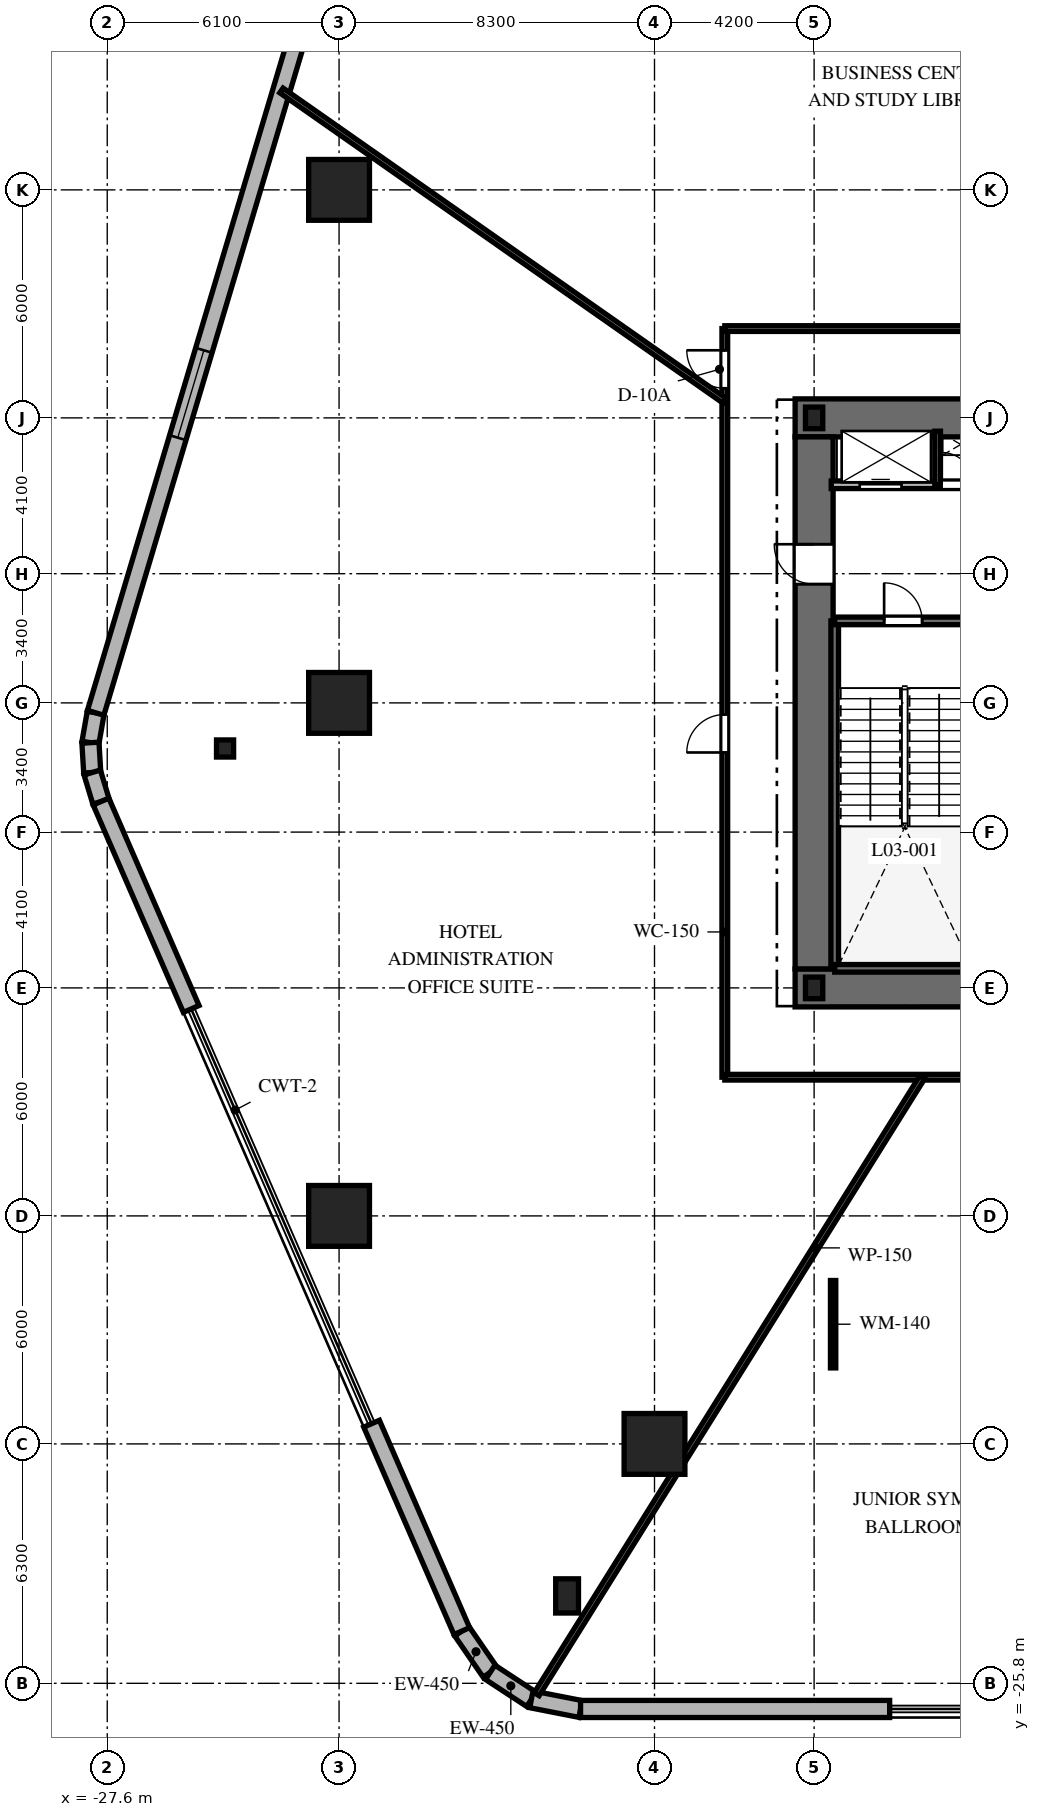
"""IFC4 building model, lengths in metres.
Left out: names, types, materials, properties, quantities, classifications, styles, units other than length and angle.
Written with IfcOpenShell. Run it as: python <this file> out.ifc"""

import sys

from ifc_helpers import new_model, si_unit, direction, frame, frame_2d, origin, origin_2d, place, context, subcontext, project, spatial, rectangle, i_section, extrude, element, fill, save


model = new_model("IFC4")
c1 = context("Model", 3, precision=1e-05, world=origin(), true_north=direction((0.0, 1.0)))
c2 = subcontext(c1, "Body", "Model", "MODEL_VIEW")
j1 = project(units=[si_unit("LENGTHUNIT", "METRE"), si_unit("PLANEANGLEUNIT", "RADIAN")], contexts=[c1])
p1 = place(None, origin())
s1 = spatial("IfcSite", under=j1, at=p1, CompositionType="ELEMENT")
p2 = place(p1, origin())
s2 = spatial("IfcBuilding", under=s1, at=p2, CompositionType="ELEMENT")
p3 = place(p2, frame((0.0, 0.0, 18.6)))
s3 = spatial("IfcBuildingStorey", under=s2, at=p3, CompositionType="ELEMENT", Elevation=18.6)
p4 = place(p3, frame((-9.5, -7.5, 0.0), z_axis=(0.0, 0.0, 1.0), x_axis=(1.0, 0.0, 0.0)))
e1 = element("IfcWall", 1, at=p4, inside=s3, PredefinedType="SHEAR", context=c2, shape_type="SweptSolid", body=[
    extrude(rectangle(XDim=19.0, YDim=1.0, at=frame_2d((9.5, 0.0))), origin(), (0.0, 0.0, 1.0), 4.8),
])
p5 = place(p4, frame((9.55, 0.0, 0.0)))
e2 = element("IfcOpeningElement", 2, at=p5, cuts=e1, PredefinedType="OPENING", context=c2, shape_type="SweptSolid", body=[
    extrude(rectangle(XDim=1.0, YDim=2.15, at=frame_2d((0.5, 1.075))), frame((0.0, 0.51, 0.0), z_axis=(0.0, -1.0, 0.0), x_axis=(1.0, 0.0, 0.0)), (0.0, 0.0, 1.0), 1.02),
])
p6 = place(p3, frame((-9.5, 7.5, 0.0), z_axis=(0.0, 0.0, 1.0), x_axis=(1.0, 0.0, 0.0)))
e3 = element("IfcWall", 3, at=p6, inside=s3, PredefinedType="SHEAR", context=c2, shape_type="SweptSolid", body=[
    extrude(rectangle(XDim=9.55, YDim=1.0, at=frame_2d((4.775, 0.0))), origin(), (0.0, 0.0, 1.0), 4.8),
])
p7 = place(p3, frame((-9.0, -7.0, 0.0), z_axis=(0.0, 0.0, 1.0), x_axis=(0.0, 1.0, 0.0)))
e4 = element("IfcWall", 4, at=p7, inside=s3, PredefinedType="SHEAR", context=c2, shape_type="SweptSolid", body=[
    extrude(rectangle(XDim=14.0, YDim=1.0, at=frame_2d((7.0, 0.0))), origin(), (0.0, 0.0, 1.0), 4.8),
])
p8 = place(p7, frame((10.125, 0.0, 0.0)))
e5 = element("IfcOpeningElement", 5, at=p8, cuts=e4, PredefinedType="OPENING", context=c2, shape_type="SweptSolid", body=[
    extrude(rectangle(XDim=1.05, YDim=2.15, at=frame_2d((0.525, 1.075))), frame((0.0, 0.51, 0.0), z_axis=(0.0, -1.0, 0.0), x_axis=(1.0, 0.0, 0.0)), (0.0, 0.0, 1.0), 1.02),
])
p9 = place(p3, frame((-8.458, -6.985, 0.0), z_axis=(0.0, 0.0, 1.0), x_axis=(0.0, 1.0, 0.0)))
e6 = element("IfcWall", 6, at=p9, inside=s3, PredefinedType="SHEAR", context=c2, shape_type="SweptSolid", body=[
    extrude(rectangle(XDim=9.143, YDim=0.2, at=frame_2d((4.572, 0.0))), origin(), (0.0, 0.0, 1.0), 4.8),
])
p10 = place(p3, frame((-8.458, -6.985, 0.0), z_axis=(0.0, 0.0, 1.0), x_axis=(1.0, 0.0, 0.0)))
e7 = element("IfcWall", 7, at=p10, inside=s3, PredefinedType="SHEAR", context=c2, shape_type="SweptSolid", body=[
    extrude(rectangle(XDim=3.686, YDim=0.2, at=frame_2d((1.843, 0.0))), origin(), (0.0, 0.0, 1.0), 4.8),
])
p11 = place(p3, frame((-8.458, 2.158, 0.0), z_axis=(0.0, 0.0, 1.0), x_axis=(1.0, 0.0, 0.0)))
e8 = element("IfcWall", 8, at=p11, inside=s3, PredefinedType="SHEAR", context=c2, shape_type="SweptSolid", body=[
    extrude(rectangle(XDim=3.686, YDim=0.2, at=frame_2d((1.843, 0.0))), origin(), (0.0, 0.0, 1.0), 4.8),
])
p12 = place(p11, frame((1.3, 0.0, 0.0)))
e9 = element("IfcOpeningElement", 9, at=p12, cuts=e8, PredefinedType="OPENING", context=c2, shape_type="SweptSolid", body=[
    extrude(rectangle(XDim=1.0, YDim=2.15, at=frame_2d((0.5, 1.075))), frame((0.0, 0.11, 0.0), z_axis=(0.0, -1.0, 0.0), x_axis=(1.0, 0.0, 0.0)), (0.0, 0.0, 1.0), 0.22),
])
for number, where, z_axis, x_axis in (
    (10, (-9.0, -7.5, 0.0), (0.0, 0.0, 1.0), (1.0, 0.0, 0.0)),
    (11, (-9.0, 7.5, 0.0), (0.0, 0.0, 1.0), (1.0, 0.0, 0.0)),
):
    element("IfcColumn", number, at=place(p3, frame(where, z_axis=z_axis, x_axis=x_axis)), inside=s3, PredefinedType="COLUMN", context=c2, shape_type="SweptSolid", body=[
        extrude(i_section(OverallWidth=0.454, OverallDepth=0.569, WebThickness=0.078, FlangeThickness=0.125, at=origin_2d()), origin(), (0.0, 0.0, 1.0), 4.8),
    ])
for number, where, z_axis, x_axis in (
    (12, (-21.5, -13.5, 0.0), (0.0, 0.0, 1.0), (1.0, 0.0, 0.0)),
    (13, (-21.5, 0.0, 0.0), (0.0, 0.0, 1.0), (1.0, 0.0, 0.0)),
    (14, (-21.5, 13.5, 0.0), (0.0, 0.0, 1.0), (1.0, 0.0, 0.0)),
    (15, (-13.2, -19.5, 0.0), (0.0, 0.0, 1.0), (1.0, 0.0, 0.0)),
):
    element("IfcColumn", number, at=place(p3, frame(where, z_axis=z_axis, x_axis=x_axis)), inside=s3, PredefinedType="COLUMN", context=c2, shape_type="SweptSolid", body=[
        extrude(rectangle(XDim=1.6, YDim=1.6, at=origin_2d()), origin(), (0.0, 0.0, 1.0), 4.8),
    ])
p13 = place(p3, frame((-15.5, -23.5, 0.0), z_axis=(0.0, 0.0, 1.0), x_axis=(1.0, 0.0, 0.0)))
e16 = element("IfcColumn", 16, at=p13, inside=s3, PredefinedType="PILASTER", context=c2, shape_type="SweptSolid", body=[
    extrude(rectangle(XDim=0.6, YDim=0.9, at=origin_2d()), origin(), (0.0, 0.0, 1.0), 4.8),
])
p14 = place(p3, frame((-24.5, -1.2, 0.0), z_axis=(0.0, 0.0, 1.0), x_axis=(1.0, 0.0, 0.0)))
e17 = element("IfcColumn", 17, at=p14, inside=s3, PredefinedType="PILASTER", context=c2, shape_type="SweptSolid", body=[
    extrude(rectangle(XDim=0.45, YDim=0.45, at=origin_2d()), origin(), (0.0, 0.0, 1.0), 4.8),
])
p15 = place(p3, frame((-18.271, -24.426, 0.0), z_axis=(0.0, 0.0, 1.0), x_axis=(0.567629051817, -0.823284434162, 0.0)))
e18 = element("IfcWall", 18, at=p15, inside=s3, PredefinedType="SOLIDWALL", context=c2, shape_type="SweptSolid", body=[
    extrude(rectangle(XDim=1.318, YDim=0.45, at=frame_2d((0.659, 0.0))), origin(), (0.0, 0.0, 1.0), 4.48),
])
p16 = place(p3, frame((-17.523, -25.511, 0.0), z_axis=(0.0, 0.0, 1.0), x_axis=(0.83622878949, -0.548380717776, 0.0)))
e19 = element("IfcWall", 19, at=p16, inside=s3, PredefinedType="SOLIDWALL", context=c2, shape_type="SweptSolid", body=[
    extrude(rectangle(XDim=1.296, YDim=0.45, at=frame_2d((0.648, 0.0))), origin(), (0.0, 0.0, 1.0), 4.48),
])
p17 = place(p3, frame((-16.439, -26.222, 0.0), z_axis=(0.0, 0.0, 1.0), x_axis=(0.98134938685, -0.192232621919, 0.0)))
e20 = element("IfcWall", 20, at=p17, inside=s3, PredefinedType="SOLIDWALL", context=c2, shape_type="SweptSolid", body=[
    extrude(rectangle(XDim=1.318, YDim=0.45, at=frame_2d((0.659, 0.0))), origin(), (0.0, 0.0, 1.0), 4.48),
])
p18 = place(p3, frame((-27.905, -0.26, 0.0), z_axis=(0.0, 0.0, 1.0), x_axis=(-0.17266943956, -0.984979829561, 0.0)))
e21 = element("IfcWall", 21, at=p18, inside=s3, PredefinedType="SOLIDWALL", context=c2, shape_type="SweptSolid", body=[
    extrude(rectangle(XDim=0.799, YDim=0.45, at=frame_2d((0.399, 0.0))), origin(), (0.0, 0.0, 1.0), 4.48),
])
p19 = place(p3, frame((-28.042, -1.047, 0.0), z_axis=(0.0, 0.0, 1.0), x_axis=(0.059960394052, -0.998200756935, 0.0)))
e22 = element("IfcWall", 22, at=p19, inside=s3, PredefinedType="SOLIDWALL", context=c2, shape_type="SweptSolid", body=[
    extrude(rectangle(XDim=0.786, YDim=0.45, at=frame_2d((0.393, 0.0))), origin(), (0.0, 0.0, 1.0), 4.48),
])
p20 = place(p3, frame((-27.995, -1.832, 0.0), z_axis=(0.0, 0.0, 1.0), x_axis=(0.2894220622, -0.957201582694, 0.0)))
e23 = element("IfcWall", 23, at=p20, inside=s3, PredefinedType="SOLIDWALL", context=c2, shape_type="SweptSolid", body=[
    extrude(rectangle(XDim=0.799, YDim=0.45, at=frame_2d((0.399, 0.0))), origin(), (0.0, 0.0, 1.0), 4.48),
])
p21 = place(p3, frame((-15.146, -26.475, 0.0), z_axis=(0.0, 0.0, 1.0), x_axis=(1.0, 0.0, 0.0)))
e24 = element("IfcWall", 24, at=p21, inside=s3, PredefinedType="SOLIDWALL", context=c2, shape_type="SweptSolid", body=[
    extrude(rectangle(XDim=8.133, YDim=0.45, at=frame_2d((4.066, 0.0))), origin(), (0.0, 0.0, 1.0), 4.48),
])
p22 = place(p3, frame((-20.651, 24.042, 0.0), z_axis=(0.0, 0.0, 1.0), x_axis=(-0.286003469805, -0.958228581947, 0.0)))
e25 = element("IfcWall", 25, at=p22, inside=s3, PredefinedType="SOLIDWALL", context=c2, shape_type="SweptSolid", body=[
    extrude(rectangle(XDim=25.362, YDim=0.45, at=frame_2d((12.681, 0.0))), origin(), (0.0, 0.0, 1.0), 4.48),
])
p23 = place(p22, frame((3.157, 0.0, 0.85)))
e26 = element("IfcOpeningElement", 26, at=p23, cuts=e25, PredefinedType="OPENING", context=c2, shape_type="SweptSolid", body=[
    extrude(rectangle(XDim=2.4, YDim=2.4, at=frame_2d((1.2, 1.2))), frame((0.0, 0.235, 0.0), z_axis=(0.0, -1.0, 0.0), x_axis=(1.0, 0.0, 0.0)), (0.0, 0.0, 1.0), 0.47),
])
p24 = place(p22, frame((15.407, 0.0, 0.85)))
e27 = element("IfcOpeningElement", 27, at=p24, cuts=e25, PredefinedType="OPENING", context=c2, shape_type="SweptSolid", body=[
    extrude(rectangle(XDim=2.4, YDim=2.4, at=frame_2d((1.2, 1.2))), frame((0.0, 0.235, 0.0), z_axis=(0.0, -1.0, 0.0), x_axis=(1.0, 0.0, 0.0)), (0.0, 0.0, 1.0), 0.47),
])
p25 = place(p3, frame((-27.764, -2.596, 0.0), z_axis=(0.0, 0.0, 1.0), x_axis=(0.398805616553, -0.917035484704, 0.0)))
e28 = element("IfcWall", 28, at=p25, inside=s3, PredefinedType="SOLIDWALL", context=c2, shape_type="SweptSolid", body=[
    extrude(rectangle(XDim=5.951, YDim=0.45, at=frame_2d((2.976, 0.0))), origin(), (0.0, 0.0, 1.0), 4.48),
])
p26 = place(p3, frame((-20.645, -18.968, 0.0), z_axis=(0.0, 0.0, 1.0), x_axis=(0.39881010906, -0.917033530964, 0.0)))
e29 = element("IfcWall", 29, at=p26, inside=s3, PredefinedType="SOLIDWALL", context=c2, shape_type="SweptSolid", body=[
    extrude(rectangle(XDim=5.952, YDim=0.45, at=frame_2d((2.976, 0.0))), origin(), (0.0, 0.0, 1.0), 4.48),
])
p27 = place(p3, frame((-8.55, 5.74, 0.0), z_axis=(0.0, 0.0, 1.0), x_axis=(1.0, 0.0, 0.0)))
e30 = element("IfcWall", 30, at=p27, inside=s3, PredefinedType="PARTITIONING", context=c2, shape_type="SweptSolid", body=[
    extrude(rectangle(XDim=4.05, YDim=0.2, at=frame_2d((2.025, 0.0))), origin(), (0.0, 0.0, 1.0), 4.48),
])
p28 = place(p27, frame((0.75, 0.0, 0.0)))
e31 = element("IfcOpeningElement", 31, at=p28, cuts=e30, PredefinedType="OPENING", context=c2, shape_type="SweptSolid", body=[
    extrude(rectangle(XDim=1.1, YDim=2.2, at=frame_2d((0.55, 1.1))), frame((0.0, 0.11, 0.0), z_axis=(0.0, -1.0, 0.0), x_axis=(1.0, 0.0, 0.0)), (0.0, 0.0, 1.0), 0.22),
])
p29 = place(p27, frame((2.9, 0.0, 0.0)))
e32 = element("IfcOpeningElement", 32, at=p29, cuts=e30, PredefinedType="OPENING", context=c2, shape_type="SweptSolid", body=[
    extrude(rectangle(XDim=0.85, YDim=2.03, at=frame_2d((0.425, 1.015))), frame((0.0, 0.11, 0.0), z_axis=(0.0, -1.0, 0.0), x_axis=(1.0, 0.0, 0.0)), (0.0, 0.0, 1.0), 0.22),
])
p30 = place(p3, frame((-5.75, 5.74, 0.0), z_axis=(0.0, 0.0, 1.0), x_axis=(0.0, 1.0, 0.0)))
e33 = element("IfcWall", 33, at=p30, inside=s3, PredefinedType="PARTITIONING", context=c2, shape_type="SweptSolid", body=[
    extrude(rectangle(XDim=1.41, YDim=0.15, at=frame_2d((0.705, 0.0))), origin(), (0.0, 0.0, 1.0), 4.48),
])
p31 = place(p3, frame((-11.35, -9.85, 0.0), z_axis=(0.0, 0.0, 1.0), x_axis=(0.0, 1.0, 0.0)))
e34 = element("IfcWall", 34, at=p31, inside=s3, PredefinedType="PARTITIONING", context=c2, shape_type="SweptSolid", body=[
    extrude(rectangle(XDim=19.7, YDim=0.15, at=frame_2d((9.85, 0.0))), origin(), (0.0, 0.0, 1.0), 3.522),
])
p32 = place(p31, frame((18.129, 0.0, 0.0)))
e35 = element("IfcOpeningElement", 35, at=p32, cuts=e34, PredefinedType="OPENING", context=c2, shape_type="SweptSolid", body=[
    extrude(rectangle(XDim=1.0, YDim=2.03, at=frame_2d((0.5, 1.015))), frame((0.0, 0.085, 0.0), z_axis=(0.0, -1.0, 0.0), x_axis=(1.0, 0.0, 0.0)), (0.0, 0.0, 1.0), 0.17),
])
p33 = place(p31, frame((8.545, 0.0, 0.0)))
e36 = element("IfcOpeningElement", 36, at=p33, cuts=e34, PredefinedType="OPENING", context=c2, shape_type="SweptSolid", body=[
    extrude(rectangle(XDim=1.0, YDim=2.03, at=frame_2d((0.5, 1.015))), frame((0.0, 0.085, 0.0), z_axis=(0.0, -1.0, 0.0), x_axis=(1.0, 0.0, 0.0)), (0.0, 0.0, 1.0), 0.17),
])
p34 = place(p3, frame((-11.35, 9.85, 0.0), z_axis=(0.0, 0.0, 1.0), x_axis=(1.0, 0.0, 0.0)))
e37 = element("IfcWall", 37, at=p34, inside=s3, PredefinedType="PARTITIONING", context=c2, shape_type="SweptSolid", body=[
    extrude(rectangle(XDim=22.7, YDim=0.15, at=frame_2d((11.35, 0.0))), origin(), (0.0, 0.0, 1.0), 3.522),
])
p35 = place(p34, frame((19.249, 0.0, 0.0)))
e38 = element("IfcOpeningElement", 38, at=p35, cuts=e37, PredefinedType="OPENING", context=c2, shape_type="SweptSolid", body=[
    extrude(rectangle(XDim=1.0, YDim=2.03, at=frame_2d((0.5, 1.015))), frame((0.0, 0.085, 0.0), z_axis=(0.0, -1.0, 0.0), x_axis=(1.0, 0.0, 0.0)), (0.0, 0.0, 1.0), 0.17),
])
p36 = place(p3, frame((11.35, -9.85, 0.0), z_axis=(0.0, 0.0, 1.0), x_axis=(-1.0, 0.0, 0.0)))
e39 = element("IfcWall", 39, at=p36, inside=s3, PredefinedType="PARTITIONING", context=c2, shape_type="SweptSolid", body=[
    extrude(rectangle(XDim=22.7, YDim=0.15, at=frame_2d((11.35, 0.0))), origin(), (0.0, 0.0, 1.0), 3.522),
])
p37 = place(p36, frame((13.549, 0.0, 0.0)))
e40 = element("IfcOpeningElement", 40, at=p37, cuts=e39, PredefinedType="OPENING", context=c2, shape_type="SweptSolid", body=[
    extrude(rectangle(XDim=1.8, YDim=2.2, at=frame_2d((0.9, 1.1))), frame((0.0, 0.085, 0.0), z_axis=(0.0, -1.0, 0.0), x_axis=(1.0, 0.0, 0.0)), (0.0, 0.0, 1.0), 0.17),
])
p38 = place(p36, frame((7.351, 0.0, 0.0)))
e41 = element("IfcOpeningElement", 41, at=p38, cuts=e39, PredefinedType="OPENING", context=c2, shape_type="SweptSolid", body=[
    extrude(rectangle(XDim=1.8, YDim=2.2, at=frame_2d((0.9, 1.1))), frame((0.0, 0.085, 0.0), z_axis=(0.0, -1.0, 0.0), x_axis=(1.0, 0.0, 0.0)), (0.0, 0.0, 1.0), 0.17),
])
p39 = place(p3, frame((-6.155, -9.85, 0.0), z_axis=(0.0, 0.0, 1.0), x_axis=(-0.529924429771, -0.848044868348, 0.0)))
e42 = element("IfcWall", 42, at=p39, inside=s3, PredefinedType="PARTITIONING", context=c2, shape_type="SweptSolid", body=[
    extrude(rectangle(XDim=19.145, YDim=0.15, at=frame_2d((9.572, 0.0))), origin(), (0.0, 0.0, 1.0), 3.612),
])
p40 = place(p3, frame((-11.35, 7.948, 0.0), z_axis=(0.0, 0.0, 1.0), x_axis=(-0.819152990014, 0.573575085713, 0.0)))
e43 = element("IfcWall", 43, at=p40, inside=s3, PredefinedType="PARTITIONING", context=c2, shape_type="SweptSolid", body=[
    extrude(rectangle(XDim=14.242, YDim=0.15, at=frame_2d((7.121, 0.0))), origin(), (0.0, 0.0, 1.0), 3.614),
])
p41 = place(p3, frame((-8.5, -17.5, 0.0), z_axis=(0.0, 0.0, 1.0), x_axis=(0.0, 1.0, 0.0)))
e44 = element("IfcWall", 44, at=p41, inside=s3, PredefinedType="MOVABLE", context=c2, shape_type="SweptSolid", body=[
    extrude(rectangle(XDim=2.3, YDim=0.14, at=frame_2d((1.15, 0.0))), origin(), (0.0, 0.0, 1.0), 4.48),
])
p42 = place(p24, origin())
e45 = element("IfcWindow", 45, at=p42, inside=s3, PartitioningType="SINGLE_PANEL", PredefinedType="WINDOW", context=c2, shape_type="SweptSolid", body=[
    extrude(rectangle(XDim=2.4, YDim=2.4, at=frame_2d((1.2, 1.2))), frame((0.0, 0.03, 0.0), z_axis=(0.0, -1.0, 0.0), x_axis=(1.0, 0.0, 0.0)), (0.0, 0.0, 1.0), 0.06),
])
fill(e27, e45)
p43 = place(p12, origin())
e46 = element("IfcDoor", 46, at=p43, inside=s3, OperationType="SINGLE_SWING_LEFT", PredefinedType="DOOR", context=c2, shape_type="SweptSolid", body=[
    extrude(rectangle(XDim=1.0, YDim=2.15, at=frame_2d((0.5, 1.075))), frame((0.0, 0.025, 0.0), z_axis=(0.0, -1.0, 0.0), x_axis=(1.0, 0.0, 0.0)), (0.0, 0.0, 1.0), 0.05),
])
fill(e9, e46)
p44 = place(p8, origin())
e47 = element("IfcDoor", 47, at=p44, inside=s3, OperationType="SINGLE_SWING_RIGHT", PredefinedType="DOOR", context=c2, shape_type="SweptSolid", body=[
    extrude(rectangle(XDim=1.05, YDim=2.15, at=frame_2d((0.525, 1.075))), frame((0.0, 0.025, 0.0), z_axis=(0.0, -1.0, 0.0), x_axis=(1.0, 0.0, 0.0)), (0.0, 0.0, 1.0), 0.05),
])
fill(e5, e47)
p45 = place(p28, origin())
e48 = element("IfcDoor", 48, at=p45, inside=s3, OperationType="SLIDING_TO_LEFT", PredefinedType="DOOR", context=c2, shape_type="SweptSolid", body=[
    extrude(rectangle(XDim=1.1, YDim=2.2, at=frame_2d((0.55, 1.1))), frame((0.0, 0.025, 0.0), z_axis=(0.0, -1.0, 0.0), x_axis=(1.0, 0.0, 0.0)), (0.0, 0.0, 1.0), 0.05),
])
fill(e31, e48)
p46 = place(p29, origin())
e49 = element("IfcDoor", 49, at=p46, inside=s3, OperationType="SINGLE_SWING_LEFT", PredefinedType="DOOR", context=c2, shape_type="SweptSolid", body=[
    extrude(rectangle(XDim=0.85, YDim=2.03, at=frame_2d((0.425, 1.015))), frame((0.0, 0.025, 0.0), z_axis=(0.0, -1.0, 0.0), x_axis=(1.0, 0.0, 0.0)), (0.0, 0.0, 1.0), 0.05),
])
fill(e32, e49)
p47 = place(p32, origin())
e50 = element("IfcDoor", 50, at=p47, inside=s3, OperationType="SINGLE_SWING_RIGHT", PredefinedType="DOOR", context=c2, shape_type="SweptSolid", body=[
    extrude(rectangle(XDim=1.0, YDim=2.03, at=frame_2d((0.5, 1.015))), frame((0.0, 0.025, 0.0), z_axis=(0.0, -1.0, 0.0), x_axis=(1.0, 0.0, 0.0)), (0.0, 0.0, 1.0), 0.05),
])
fill(e35, e50)
p48 = place(p33, origin())
e51 = element("IfcDoor", 51, at=p48, inside=s3, OperationType="SINGLE_SWING_LEFT", PredefinedType="DOOR", context=c2, shape_type="SweptSolid", body=[
    extrude(rectangle(XDim=1.0, YDim=2.03, at=frame_2d((0.5, 1.015))), frame((0.0, 0.025, 0.0), z_axis=(0.0, -1.0, 0.0), x_axis=(1.0, 0.0, 0.0)), (0.0, 0.0, 1.0), 0.05),
])
fill(e36, e51)
save(model, sys.argv[1])
